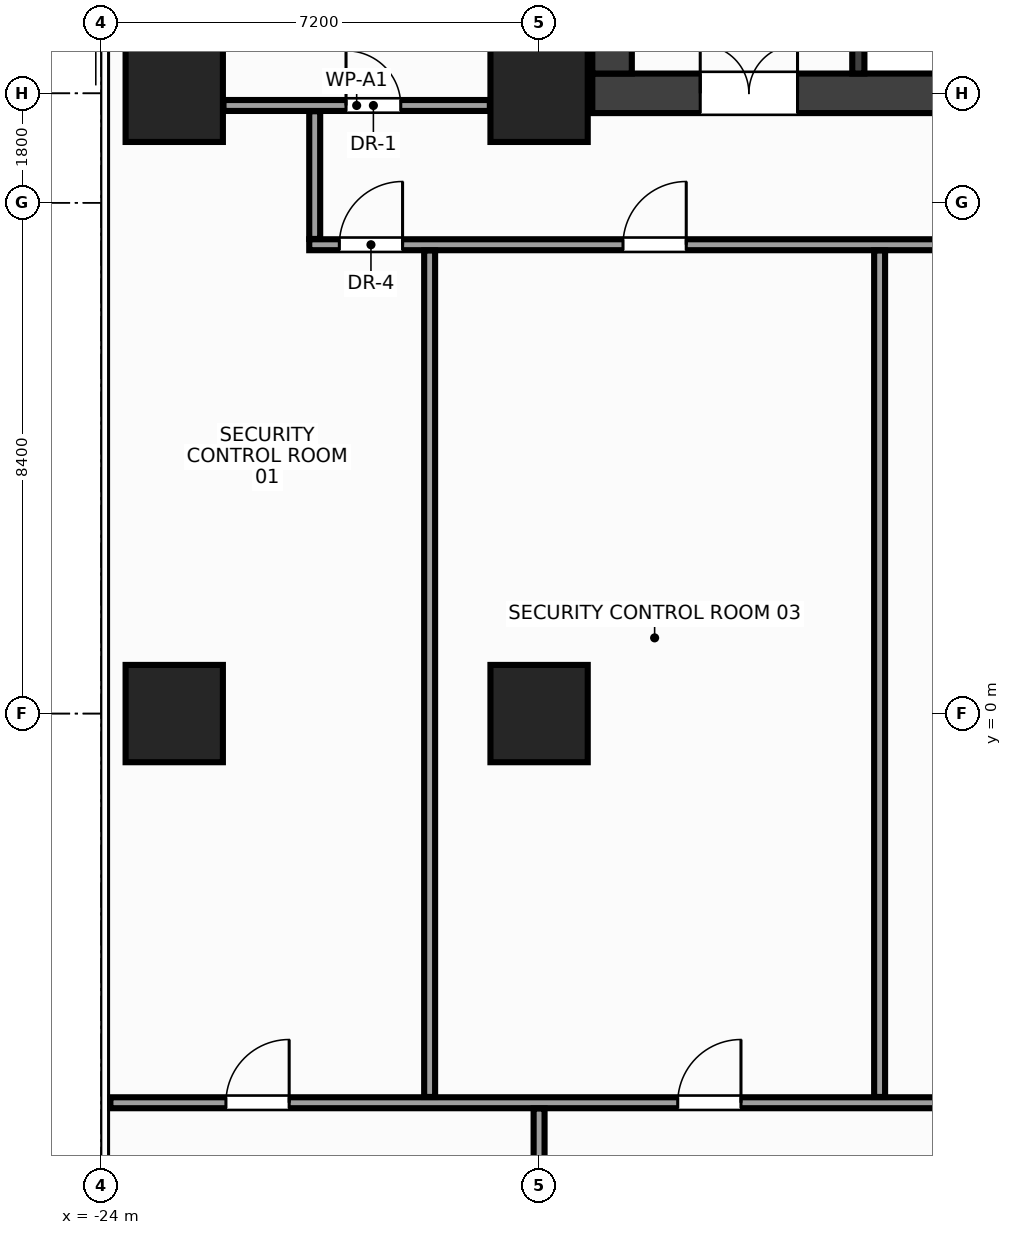
"""IFC4 building model, lengths in metres.
Left out: names, types, materials, properties, quantities, classifications, styles, units other than length and angle.
Written with IfcOpenShell. Run it as: python <this file> out.ifc"""

import sys

from ifc_helpers import new_model, si_unit, direction, frame, frame_2d, origin, origin_2d, place, context, subcontext, project, spatial, rectangle, extrude, source, transform, mapped, element, fill, save


model = new_model("IFC4")
c1 = context("Model", 3, precision=1e-05, world=origin(), true_north=direction((0.0, 1.0)))
c2 = subcontext(c1, "Body", "Model", "MODEL_VIEW")
j1 = project(units=[si_unit("LENGTHUNIT", "METRE"), si_unit("PLANEANGLEUNIT", "RADIAN")], contexts=[c1])
p1 = place(None, origin())
s1 = spatial("IfcSite", under=j1, at=p1, CompositionType="ELEMENT")
p2 = place(p1, origin())
s2 = spatial("IfcBuilding", under=s1, at=p2, CompositionType="ELEMENT")
p3 = place(p2, frame((0.0, 0.0, 174.8)))
s3 = spatial("IfcBuildingStorey", under=s2, at=p3, CompositionType="ELEMENT", Elevation=174.8)
m1 = source(origin(), c2, "Body", "SweptSolid", [
    extrude(rectangle(XDim=31.85, YDim=0.65, at=frame_2d((15.925, 0.0))), origin(), (0.0, 0.0, 1.0), 3.6),
])
p4 = place(p3, frame((-15.925, 10.2, 0.0), z_axis=(0.0, 0.0, 1.0), x_axis=(1.0, 0.0, 0.0)))
e1 = element("IfcWall", 1, at=p4, inside=s3, PredefinedType="SHEAR", context=c2, shape_type="MappedRepresentation", body=[
    mapped(m1, transform((0.0, 0.0, 0.0), x_axis=(1.0, 0.0, 0.0), y_axis=(0.0, 1.0, 0.0), z_axis=(0.0, 0.0, 1.0), scale=1.0)),
])
p5 = place(p4, frame((1.775, 0.0, 0.0)))
e2 = element("IfcOpeningElement", 2, at=p5, cuts=e1, PredefinedType="OPENING", context=c2, shape_type="SweptSolid", body=[
    extrude(rectangle(XDim=1.6, YDim=2.15, at=frame_2d((0.8, 1.075))), frame((0.0, 0.337, 0.0), z_axis=(0.0, -1.0, 0.0), x_axis=(1.0, 0.0, 0.0)), (0.0, 0.0, 1.0), 0.674),
])
p6 = place(p4, frame((28.475, 0.0, 0.0)))
e3 = element("IfcOpeningElement", 3, at=p6, cuts=e1, PredefinedType="OPENING", context=c2, shape_type="SweptSolid", body=[
    extrude(rectangle(XDim=1.6, YDim=2.15, at=frame_2d((0.8, 1.075))), frame((0.0, 0.337, 0.0), z_axis=(0.0, -1.0, 0.0), x_axis=(1.0, 0.0, 0.0)), (0.0, 0.0, 1.0), 0.674),
])
p7 = place(p4, frame((15.175, 0.0, 0.0)))
e4 = element("IfcOpeningElement", 4, at=p7, cuts=e1, PredefinedType="OPENING", context=c2, shape_type="SweptSolid", body=[
    extrude(rectangle(XDim=1.5, YDim=2.2, at=frame_2d((0.75, 1.1))), frame((0.0, 0.337, 0.0), z_axis=(0.0, -1.0, 0.0), x_axis=(1.0, 0.0, 0.0)), (0.0, 0.0, 1.0), 0.674),
])
m2 = source(origin(), c2, "Body", "SweptSolid", [
    extrude(rectangle(XDim=12.95, YDim=0.65, at=frame_2d((6.475, 0.0))), origin(), (0.0, 0.0, 1.0), 3.6),
])
p8 = place(p3, frame((-15.6, 10.525, 0.0), z_axis=(0.0, 0.0, 1.0), x_axis=(0.0, 1.0, 0.0)))
e5 = element("IfcWall", 5, at=p8, inside=s3, PredefinedType="SHEAR", context=c2, shape_type="MappedRepresentation", body=[
    mapped(m2, transform((0.0, 0.0, 0.0), x_axis=(1.0, 0.0, 0.0), y_axis=(0.0, 1.0, 0.0), z_axis=(0.0, 0.0, 1.0), scale=1.0)),
])
m3 = source(origin(), c2, "Body", "SweptSolid", [
    extrude(rectangle(XDim=3.125, YDim=0.2, at=frame_2d((1.562, 0.0))), origin(), (0.0, 0.0, 1.0), 3.6),
])
p9 = place(p3, frame((-11.55, 10.525, 0.0), z_axis=(0.0, 0.0, 1.0), x_axis=(0.0, 1.0, 0.0)))
e6 = element("IfcWall", 6, at=p9, inside=s3, PredefinedType="SHEAR", context=c2, shape_type="MappedRepresentation", body=[
    mapped(m3, transform((0.0, 0.0, 0.0), x_axis=(1.0, 0.0, 0.0), y_axis=(0.0, 1.0, 0.0), z_axis=(0.0, 0.0, 1.0), scale=1.0)),
])
p10 = place(p9, frame((0.9, 0.0, 0.0)))
e7 = element("IfcOpeningElement", 7, at=p10, cuts=e6, PredefinedType="OPENING", context=c2, shape_type="SweptSolid", body=[
    extrude(rectangle(XDim=1.1, YDim=2.15, at=frame_2d((0.55, 1.075))), frame((0.0, 0.112, 0.0), z_axis=(0.0, -1.0, 0.0), x_axis=(1.0, 0.0, 0.0)), (0.0, 0.0, 1.0), 0.224),
])
m4 = source(origin(), c2, "Body", "SweptSolid", [
    extrude(rectangle(XDim=1.6, YDim=1.6, at=origin_2d()), origin(), (0.0, 0.0, 1.0), 3.6),
])
for number, where, z_axis, x_axis in (
    (8, (-16.8, 0.0, 0.0), (0.0, 0.0, 1.0), (1.0, 0.0, 0.0)),
    (9, (-16.8, 10.2, 0.0), (0.0, 0.0, 1.0), (1.0, 0.0, 0.0)),
    (10, (-22.8, 0.0, 0.0), (0.0, 0.0, 1.0), (1.0, 0.0, 0.0)),
    (11, (-22.8, 10.2, 0.0), (0.0, 0.0, 1.0), (1.0, 0.0, 0.0)),
):
    element("IfcColumn", number, at=place(p3, frame(where, z_axis=z_axis, x_axis=x_axis)), inside=s3, PredefinedType="COLUMN", context=c2, shape_type="MappedRepresentation", body=[
        mapped(m4, transform((0.0, 0.0, 0.0), x_axis=(1.0, 0.0, 0.0), y_axis=(0.0, 1.0, 0.0), z_axis=(0.0, 0.0, 1.0), scale=1.0)),
    ])
m5 = source(origin(), c2, "Body", "SweptSolid", [
    extrude(rectangle(XDim=4.38, YDim=0.18, at=frame_2d((2.19, 0.0))), origin(), (0.0, 0.0, 1.0), 2.915),
])
p11 = place(p3, frame((-21.99, 10.0, 0.0), z_axis=(0.0, 0.0, 1.0), x_axis=(1.0, 0.0, 0.0)))
e12 = element("IfcWall", 12, at=p11, inside=s3, PredefinedType="PARTITIONING", context=c2, shape_type="MappedRepresentation", body=[
    mapped(m5, transform((0.0, 0.0, 0.0), x_axis=(1.0, 0.0, 0.0), y_axis=(0.0, 1.0, 0.0), z_axis=(0.0, 0.0, 1.0), scale=1.0)),
])
p12 = place(p11, frame((2.015, 0.0, 0.0)))
e13 = element("IfcOpeningElement", 13, at=p12, cuts=e12, PredefinedType="OPENING", context=c2, shape_type="SweptSolid", body=[
    extrude(rectangle(XDim=0.9, YDim=2.15, at=frame_2d((0.45, 1.075))), frame((0.0, 0.102, 0.0), z_axis=(0.0, -1.0, 0.0), x_axis=(1.0, 0.0, 0.0)), (0.0, 0.0, 1.0), 0.204),
])
m6 = source(origin(), c2, "Body", "SweptSolid", [
    extrude(rectangle(XDim=31.6, YDim=0.18, at=frame_2d((15.8, 0.0))), origin(), (0.0, 0.0, 1.0), 2.765),
])
p13 = place(p3, frame((-20.58, 7.71, 0.0), z_axis=(0.0, 0.0, 1.0), x_axis=(1.0, 0.0, 0.0)))
e14 = element("IfcWall", 14, at=p13, inside=s3, PredefinedType="PARTITIONING", context=c2, shape_type="MappedRepresentation", body=[
    mapped(m6, transform((0.0, 0.0, 0.0), x_axis=(1.0, 0.0, 0.0), y_axis=(0.0, 1.0, 0.0), z_axis=(0.0, 0.0, 1.0), scale=1.0)),
])
p14 = place(p13, frame((0.495, 0.0, 0.0)))
e15 = element("IfcOpeningElement", 15, at=p14, cuts=e14, PredefinedType="OPENING", context=c2, shape_type="SweptSolid", body=[
    extrude(rectangle(XDim=1.04, YDim=2.2, at=frame_2d((0.52, 1.1))), frame((0.0, 0.102, 0.0), z_axis=(0.0, -1.0, 0.0), x_axis=(1.0, 0.0, 0.0)), (0.0, 0.0, 1.0), 0.204),
])
p15 = place(p13, frame((5.16, 0.0, 0.0)))
e16 = element("IfcOpeningElement", 16, at=p15, cuts=e14, PredefinedType="OPENING", context=c2, shape_type="SweptSolid", body=[
    extrude(rectangle(XDim=1.04, YDim=2.2, at=frame_2d((0.52, 1.1))), frame((0.0, 0.102, 0.0), z_axis=(0.0, -1.0, 0.0), x_axis=(1.0, 0.0, 0.0)), (0.0, 0.0, 1.0), 0.204),
])
p16 = place(p13, frame((19.86, 0.0, 0.0)))
e17 = element("IfcOpeningElement", 17, at=p16, cuts=e14, PredefinedType="OPENING", context=c2, shape_type="SweptSolid", body=[
    extrude(rectangle(XDim=1.04, YDim=2.2, at=frame_2d((0.52, 1.1))), frame((0.0, 0.102, 0.0), z_axis=(0.0, -1.0, 0.0), x_axis=(1.0, 0.0, 0.0)), (0.0, 0.0, 1.0), 0.204),
])
m7 = source(origin(), c2, "Body", "SweptSolid", [
    extrude(rectangle(XDim=2.1, YDim=0.18, at=frame_2d((1.05, 0.0))), origin(), (0.0, 0.0, 1.0), 3.38),
])
p17 = place(p3, frame((-20.49, 7.805, 0.0), z_axis=(0.0, 0.0, 1.0), x_axis=(0.0, 1.0, 0.0)))
e18 = element("IfcWall", 18, at=p17, inside=s3, PredefinedType="PARTITIONING", context=c2, shape_type="MappedRepresentation", body=[
    mapped(m7, transform((0.0, 0.0, 0.0), x_axis=(1.0, 0.0, 0.0), y_axis=(0.0, 1.0, 0.0), z_axis=(0.0, 0.0, 1.0), scale=1.0)),
])
m8 = source(origin(), c2, "Body", "SweptSolid", [
    extrude(rectangle(XDim=34.865, YDim=0.18, at=frame_2d((17.433, 0.0))), origin(), (0.0, 0.0, 1.0), 2.765),
])
p18 = place(p3, frame((-23.85, -6.4, 0.0), z_axis=(0.0, 0.0, 1.0), x_axis=(1.0, 0.0, 0.0)))
e19 = element("IfcWall", 19, at=p18, inside=s3, PredefinedType="PARTITIONING", context=c2, shape_type="MappedRepresentation", body=[
    mapped(m8, transform((0.0, 0.0, 0.0), x_axis=(1.0, 0.0, 0.0), y_axis=(0.0, 1.0, 0.0), z_axis=(0.0, 0.0, 1.0), scale=1.0)),
])
p19 = place(p18, frame((1.9, 0.0, 0.0)))
e20 = element("IfcOpeningElement", 20, at=p19, cuts=e19, PredefinedType="OPENING", context=c2, shape_type="SweptSolid", body=[
    extrude(rectangle(XDim=1.04, YDim=2.2, at=frame_2d((0.52, 1.1))), frame((0.0, 0.102, 0.0), z_axis=(0.0, -1.0, 0.0), x_axis=(1.0, 0.0, 0.0)), (0.0, 0.0, 1.0), 0.204),
])
p20 = place(p18, frame((9.33, 0.0, 0.0)))
e21 = element("IfcOpeningElement", 21, at=p20, cuts=e19, PredefinedType="OPENING", context=c2, shape_type="SweptSolid", body=[
    extrude(rectangle(XDim=1.04, YDim=2.2, at=frame_2d((0.52, 1.1))), frame((0.0, 0.102, 0.0), z_axis=(0.0, -1.0, 0.0), x_axis=(1.0, 0.0, 0.0)), (0.0, 0.0, 1.0), 0.204),
])
p21 = place(p18, frame((21.33, 0.0, 0.0)))
e22 = element("IfcOpeningElement", 22, at=p21, cuts=e19, PredefinedType="OPENING", context=c2, shape_type="SweptSolid", body=[
    extrude(rectangle(XDim=1.04, YDim=2.2, at=frame_2d((0.52, 1.1))), frame((0.0, 0.102, 0.0), z_axis=(0.0, -1.0, 0.0), x_axis=(1.0, 0.0, 0.0)), (0.0, 0.0, 1.0), 0.204),
])
m9 = source(origin(), c2, "Body", "SweptSolid", [
    extrude(rectangle(XDim=13.92, YDim=0.18, at=frame_2d((6.96, 0.0))), origin(), (0.0, 0.0, 1.0), 2.915),
])
p22 = place(p3, frame((-18.6, -6.305, 0.0), z_axis=(0.0, 0.0, 1.0), x_axis=(0.0, 1.0, 0.0)))
e23 = element("IfcWall", 23, at=p22, inside=s3, PredefinedType="PARTITIONING", context=c2, shape_type="MappedRepresentation", body=[
    mapped(m9, transform((0.0, 0.0, 0.0), x_axis=(1.0, 0.0, 0.0), y_axis=(0.0, 1.0, 0.0), z_axis=(0.0, 0.0, 1.0), scale=1.0)),
])
m10 = source(origin(), c2, "Body", "SweptSolid", [
    extrude(rectangle(XDim=13.92, YDim=0.18, at=frame_2d((6.96, 0.0))), origin(), (0.0, 0.0, 1.0), 2.665),
])
p23 = place(p3, frame((-11.2, -6.305, 0.0), z_axis=(0.0, 0.0, 1.0), x_axis=(0.0, 1.0, 0.0)))
e24 = element("IfcWall", 24, at=p23, inside=s3, PredefinedType="PARTITIONING", context=c2, shape_type="MappedRepresentation", body=[
    mapped(m10, transform((0.0, 0.0, 0.0), x_axis=(1.0, 0.0, 0.0), y_axis=(0.0, 1.0, 0.0), z_axis=(0.0, 0.0, 1.0), scale=1.0)),
])
m11 = source(origin(), c2, "Body", "SweptSolid", [
    extrude(rectangle(XDim=3.495, YDim=0.18, at=frame_2d((1.748, 0.0))), origin(), (0.0, 0.0, 1.0), 2.765),
])
p24 = place(p3, frame((-16.8, -9.99, 0.0), z_axis=(0.0, 0.0, 1.0), x_axis=(0.0, 1.0, 0.0)))
e25 = element("IfcWall", 25, at=p24, inside=s3, PredefinedType="PARTITIONING", context=c2, shape_type="MappedRepresentation", body=[
    mapped(m11, transform((0.0, 0.0, 0.0), x_axis=(1.0, 0.0, 0.0), y_axis=(0.0, 1.0, 0.0), z_axis=(0.0, 0.0, 1.0), scale=1.0)),
])
m12 = source(origin(), c2, "Body", "SweptSolid", [
    extrude(rectangle(XDim=1.6, YDim=2.15, at=frame_2d((0.8, 1.075))), frame((0.0, 0.025, 0.0), z_axis=(0.0, -1.0, 0.0), x_axis=(1.0, 0.0, 0.0)), (0.0, 0.0, 1.0), 0.05),
])
p25 = place(p5, origin())
e26 = element("IfcDoor", 26, at=p25, inside=s3, OperationType="DOUBLE_DOOR_SINGLE_SWING", PredefinedType="DOOR", context=c2, shape_type="MappedRepresentation", body=[
    mapped(m12, transform((0.0, 0.0, 0.0), x_axis=(1.0, 0.0, 0.0), y_axis=(0.0, 1.0, 0.0), z_axis=(0.0, 0.0, 1.0), scale=1.0)),
])
fill(e2, e26)
m13 = source(origin(), c2, "Body", "SweptSolid", [
    extrude(rectangle(XDim=0.9, YDim=2.15, at=frame_2d((0.45, 1.075))), frame((0.0, 0.025, 0.0), z_axis=(0.0, -1.0, 0.0), x_axis=(1.0, 0.0, 0.0)), (0.0, 0.0, 1.0), 0.05),
])
p26 = place(p12, origin())
e27 = element("IfcDoor", 27, at=p26, inside=s3, OperationType="SINGLE_SWING_LEFT", PredefinedType="DOOR", context=c2, shape_type="MappedRepresentation", body=[
    mapped(m13, transform((0.0, 0.0, 0.0), x_axis=(1.0, 0.0, 0.0), y_axis=(0.0, 1.0, 0.0), z_axis=(0.0, 0.0, 1.0), scale=1.0)),
])
fill(e13, e27)
m14 = source(origin(), c2, "Body", "SweptSolid", [
    extrude(rectangle(XDim=1.04, YDim=2.2, at=frame_2d((0.52, 1.1))), frame((0.0, 0.025, 0.0), z_axis=(0.0, -1.0, 0.0), x_axis=(1.0, 0.0, 0.0)), (0.0, 0.0, 1.0), 0.05),
])
p27 = place(p14, origin())
e28 = element("IfcDoor", 28, at=p27, inside=s3, OperationType="SINGLE_SWING_RIGHT", PredefinedType="DOOR", context=c2, shape_type="MappedRepresentation", body=[
    mapped(m14, transform((0.0, 0.0, 0.0), x_axis=(1.0, 0.0, 0.0), y_axis=(0.0, 1.0, 0.0), z_axis=(0.0, 0.0, 1.0), scale=1.0)),
])
fill(e15, e28)
p28 = place(p15, origin())
e29 = element("IfcDoor", 29, at=p28, inside=s3, OperationType="SINGLE_SWING_RIGHT", PredefinedType="DOOR", context=c2, shape_type="MappedRepresentation", body=[
    mapped(m14, transform((0.0, 0.0, 0.0), x_axis=(1.0, 0.0, 0.0), y_axis=(0.0, 1.0, 0.0), z_axis=(0.0, 0.0, 1.0), scale=1.0)),
])
fill(e16, e29)
p29 = place(p19, origin())
e30 = element("IfcDoor", 30, at=p29, inside=s3, OperationType="SINGLE_SWING_RIGHT", PredefinedType="DOOR", context=c2, shape_type="MappedRepresentation", body=[
    mapped(m14, transform((0.0, 0.0, 0.0), x_axis=(1.0, 0.0, 0.0), y_axis=(0.0, 1.0, 0.0), z_axis=(0.0, 0.0, 1.0), scale=1.0)),
])
fill(e20, e30)
p30 = place(p20, origin())
e31 = element("IfcDoor", 31, at=p30, inside=s3, OperationType="SINGLE_SWING_RIGHT", PredefinedType="DOOR", context=c2, shape_type="MappedRepresentation", body=[
    mapped(m14, transform((0.0, 0.0, 0.0), x_axis=(1.0, 0.0, 0.0), y_axis=(0.0, 1.0, 0.0), z_axis=(0.0, 0.0, 1.0), scale=1.0)),
])
fill(e21, e31)
save(model, sys.argv[1])
